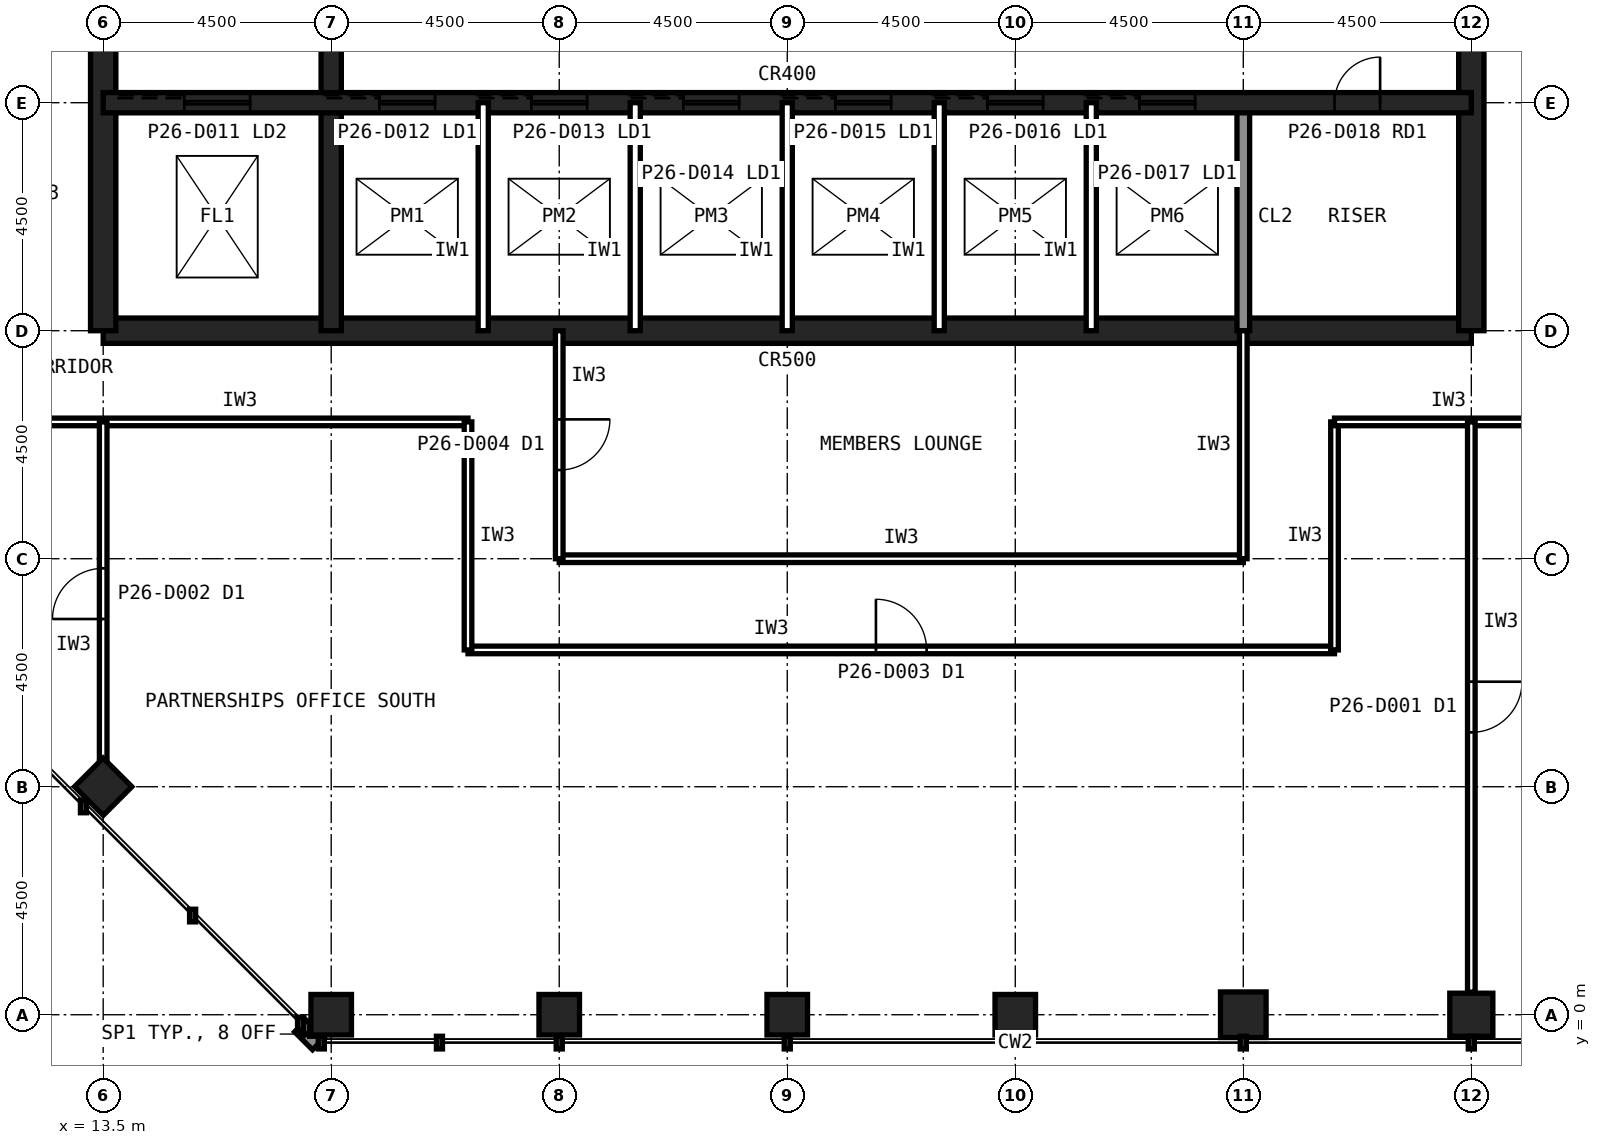
"""IFC4 building model, lengths in metres.
Left out: names, types, materials, properties, quantities, classifications, styles, units other than length and angle.
Written with IfcOpenShell. Run it as: python <this file> out.ifc"""

import sys

from ifc_helpers import new_model, si_unit, direction, frame, frame_2d, origin, origin_2d, place, context, subcontext, project, spatial, rectangle, hollow_rectangle, extrude, element, fill, save


model = new_model("IFC4")
c1 = context("Model", 3, precision=1e-05, world=origin(), true_north=direction((0.0, 1.0)))
c2 = subcontext(c1, "Body", "Model", "MODEL_VIEW")
j1 = project(units=[si_unit("LENGTHUNIT", "METRE"), si_unit("PLANEANGLEUNIT", "RADIAN")], contexts=[c1])
p1 = place(None, origin())
s1 = spatial("IfcSite", under=j1, at=p1, CompositionType="ELEMENT")
p2 = place(p1, origin())
s2 = spatial("IfcBuilding", under=s1, at=p2, CompositionType="ELEMENT")
p3 = place(p2, frame((0.0, 0.0, 115.6)))
s3 = spatial("IfcBuildingStorey", under=s2, at=p3, CompositionType="ELEMENT", Elevation=115.6)
for number, where, z_axis, x_axis in (
    (1, (18.0, 0.0, 0.0), (0.0, 0.0, 1.0), (1.0, 0.0, 0.0)),
    (2, (22.5, 0.0, 0.0), (0.0, 0.0, 1.0), (1.0, 0.0, 0.0)),
    (3, (27.0, 0.0, 0.0), (0.0, 0.0, 1.0), (1.0, 0.0, 0.0)),
    (4, (31.5, 0.0, 0.0), (0.0, 0.0, 1.0), (1.0, 0.0, 0.0)),
):
    element("IfcColumn", number, at=place(p3, frame(where, z_axis=z_axis, x_axis=x_axis)), inside=s3, PredefinedType="COLUMN", context=c2, shape_type="SweptSolid", body=[
        extrude(hollow_rectangle(XDim=0.8, YDim=0.8, WallThickness=0.045, at=origin_2d()), origin(), (0.0, 0.0, 1.0), 4.0),
    ])
p4 = place(p3, frame((36.0, 0.0, 0.0), z_axis=(0.0, 0.0, 1.0), x_axis=(1.0, 0.0, 0.0)))
e5 = element("IfcColumn", 5, at=p4, inside=s3, PredefinedType="COLUMN", context=c2, shape_type="SweptSolid", body=[
    extrude(hollow_rectangle(XDim=0.9, YDim=0.9, WallThickness=0.063, at=origin_2d()), origin(), (0.0, 0.0, 1.0), 4.0),
])
p5 = place(p3, frame((40.5, 0.0, 0.0), z_axis=(0.0, 0.0, 1.0), x_axis=(1.0, 0.0, 0.0)))
e6 = element("IfcColumn", 6, at=p5, inside=s3, PredefinedType="COLUMN", context=c2, shape_type="SweptSolid", body=[
    extrude(hollow_rectangle(XDim=0.85, YDim=0.85, WallThickness=0.05, at=origin_2d()), origin(), (0.0, 0.0, 1.0), 4.0),
])
p6 = place(p3, frame((13.5, 4.5, 0.0), z_axis=(0.0, 0.0, 1.0), x_axis=(0.707106781187, 0.707106781187, 0.0)))
e7 = element("IfcColumn", 7, at=p6, inside=s3, PredefinedType="COLUMN", context=c2, shape_type="SweptSolid", body=[
    extrude(hollow_rectangle(XDim=0.8, YDim=0.8, WallThickness=0.045, at=origin_2d()), origin(), (0.0, 0.0, 1.0), 4.0),
])
p7 = place(p3, frame((13.5, 13.5, 0.0), z_axis=(0.0, 0.0, 1.0), x_axis=(1.0, 0.0, 0.0)))
e8 = element("IfcWall", 8, at=p7, inside=s3, PredefinedType="SHEAR", context=c2, shape_type="SweptSolid", body=[
    extrude(rectangle(XDim=27.0, YDim=0.5, at=frame_2d((13.5, 0.0))), origin(), (0.0, 0.0, 1.0), 4.0),
])
p8 = place(p3, frame((40.5, 13.5, 0.0), z_axis=(0.0, 0.0, 1.0), x_axis=(0.0, 1.0, 0.0)))
e9 = element("IfcWall", 9, at=p8, inside=s3, PredefinedType="SHEAR", context=c2, shape_type="SweptSolid", body=[
    extrude(rectangle(XDim=27.0, YDim=0.5, at=frame_2d((13.5, 0.0))), origin(), (0.0, 0.0, 1.0), 4.0),
])
p9 = place(p8, frame((5.85, 0.0, 0.0)))
e10 = element("IfcOpeningElement", 10, at=p9, cuts=e9, PredefinedType="OPENING", context=c2, shape_type="SweptSolid", body=[
    extrude(rectangle(XDim=1.8, YDim=2.1, at=frame_2d((0.9, 1.05))), frame((0.0, 0.26, 0.0), z_axis=(0.0, -1.0, 0.0), x_axis=(1.0, 0.0, 0.0)), (0.0, 0.0, 1.0), 0.52),
])
p10 = place(p8, frame((19.65, 0.0, 0.0)))
e11 = element("IfcOpeningElement", 11, at=p10, cuts=e9, PredefinedType="OPENING", context=c2, shape_type="SweptSolid", body=[
    extrude(rectangle(XDim=1.2, YDim=2.1, at=frame_2d((0.6, 1.05))), frame((0.0, 0.26, 0.0), z_axis=(0.0, -1.0, 0.0), x_axis=(1.0, 0.0, 0.0)), (0.0, 0.0, 1.0), 0.52),
])
p11 = place(p3, frame((13.5, 40.5, 0.0), z_axis=(0.0, 0.0, 1.0), x_axis=(0.0, -1.0, 0.0)))
e12 = element("IfcWall", 12, at=p11, inside=s3, PredefinedType="SHEAR", context=c2, shape_type="SweptSolid", body=[
    extrude(rectangle(XDim=27.0, YDim=0.5, at=frame_2d((13.5, 0.0))), origin(), (0.0, 0.0, 1.0), 4.0),
])
p12 = place(p11, frame((19.65, 0.0, 0.0)))
e13 = element("IfcOpeningElement", 13, at=p12, cuts=e12, PredefinedType="OPENING", context=c2, shape_type="SweptSolid", body=[
    extrude(rectangle(XDim=1.2, YDim=2.1, at=frame_2d((0.6, 1.05))), frame((0.0, 0.26, 0.0), z_axis=(0.0, -1.0, 0.0), x_axis=(1.0, 0.0, 0.0)), (0.0, 0.0, 1.0), 0.52),
])
p13 = place(p11, frame((5.85, 0.0, 0.0)))
e14 = element("IfcOpeningElement", 14, at=p13, cuts=e12, PredefinedType="OPENING", context=c2, shape_type="SweptSolid", body=[
    extrude(rectangle(XDim=1.8, YDim=2.1, at=frame_2d((0.9, 1.05))), frame((0.0, 0.26, 0.0), z_axis=(0.0, -1.0, 0.0), x_axis=(1.0, 0.0, 0.0)), (0.0, 0.0, 1.0), 0.52),
])
p14 = place(p3, frame((18.0, 13.5, 0.0), z_axis=(0.0, 0.0, 1.0), x_axis=(0.0, 1.0, 0.0)))
e15 = element("IfcWall", 15, at=p14, inside=s3, PredefinedType="SHEAR", context=c2, shape_type="SweptSolid", body=[
    extrude(rectangle(XDim=18.0, YDim=0.4, at=frame_2d((9.0, 0.0))), origin(), (0.0, 0.0, 1.0), 4.0),
])
p15 = place(p3, frame((36.0, 13.5, 0.0), z_axis=(0.0, 0.0, 1.0), x_axis=(0.0, 1.0, 0.0)))
e16 = element("IfcWall", 16, at=p15, inside=s3, PredefinedType="SOLIDWALL", context=c2, shape_type="SweptSolid", body=[
    extrude(rectangle(XDim=4.5, YDim=0.25, at=frame_2d((2.25, 0.0))), origin(), (0.0, 0.0, 1.0), 3.84),
])
p16 = place(p3, frame((13.5, 18.0, 0.0), z_axis=(0.0, 0.0, 1.0), x_axis=(1.0, 0.0, 0.0)))
e17 = element("IfcWall", 17, at=p16, inside=s3, PredefinedType="SHEAR", context=c2, shape_type="SweptSolid", body=[
    extrude(rectangle(XDim=27.0, YDim=0.4, at=frame_2d((13.5, 0.0))), origin(), (0.0, 0.0, 1.0), 4.0),
])
p17 = place(p16, frame((24.3, 0.0, 0.0)))
e18 = element("IfcOpeningElement", 18, at=p17, cuts=e17, PredefinedType="OPENING", context=c2, shape_type="SweptSolid", body=[
    extrude(rectangle(XDim=0.9, YDim=2.1, at=frame_2d((0.45, 1.05))), frame((0.0, 0.21, 0.0), z_axis=(0.0, -1.0, 0.0), x_axis=(1.0, 0.0, 0.0)), (0.0, 0.0, 1.0), 0.42),
])
p18 = place(p16, frame((5.45, 0.0, 0.0)))
e19 = element("IfcOpeningElement", 19, at=p18, cuts=e17, PredefinedType="OPENING", context=c2, shape_type="SweptSolid", body=[
    extrude(rectangle(XDim=1.1, YDim=2.1, at=frame_2d((0.55, 1.05))), frame((0.0, 0.21, 0.0), z_axis=(0.0, -1.0, 0.0), x_axis=(1.0, 0.0, 0.0)), (0.0, 0.0, 1.0), 0.42),
])
p19 = place(p16, frame((8.45, 0.0, 0.0)))
e20 = element("IfcOpeningElement", 20, at=p19, cuts=e17, PredefinedType="OPENING", context=c2, shape_type="SweptSolid", body=[
    extrude(rectangle(XDim=1.1, YDim=2.1, at=frame_2d((0.55, 1.05))), frame((0.0, 0.21, 0.0), z_axis=(0.0, -1.0, 0.0), x_axis=(1.0, 0.0, 0.0)), (0.0, 0.0, 1.0), 0.42),
])
p20 = place(p16, frame((11.45, 0.0, 0.0)))
e21 = element("IfcOpeningElement", 21, at=p20, cuts=e17, PredefinedType="OPENING", context=c2, shape_type="SweptSolid", body=[
    extrude(rectangle(XDim=1.1, YDim=2.1, at=frame_2d((0.55, 1.05))), frame((0.0, 0.21, 0.0), z_axis=(0.0, -1.0, 0.0), x_axis=(1.0, 0.0, 0.0)), (0.0, 0.0, 1.0), 0.42),
])
p21 = place(p16, frame((14.45, 0.0, 0.0)))
e22 = element("IfcOpeningElement", 22, at=p21, cuts=e17, PredefinedType="OPENING", context=c2, shape_type="SweptSolid", body=[
    extrude(rectangle(XDim=1.1, YDim=2.1, at=frame_2d((0.55, 1.05))), frame((0.0, 0.21, 0.0), z_axis=(0.0, -1.0, 0.0), x_axis=(1.0, 0.0, 0.0)), (0.0, 0.0, 1.0), 0.42),
])
p22 = place(p16, frame((17.45, 0.0, 0.0)))
e23 = element("IfcOpeningElement", 23, at=p22, cuts=e17, PredefinedType="OPENING", context=c2, shape_type="SweptSolid", body=[
    extrude(rectangle(XDim=1.1, YDim=2.1, at=frame_2d((0.55, 1.05))), frame((0.0, 0.21, 0.0), z_axis=(0.0, -1.0, 0.0), x_axis=(1.0, 0.0, 0.0)), (0.0, 0.0, 1.0), 0.42),
])
p23 = place(p16, frame((20.45, 0.0, 0.0)))
e24 = element("IfcOpeningElement", 24, at=p23, cuts=e17, PredefinedType="OPENING", context=c2, shape_type="SweptSolid", body=[
    extrude(rectangle(XDim=1.1, YDim=2.1, at=frame_2d((0.55, 1.05))), frame((0.0, 0.21, 0.0), z_axis=(0.0, -1.0, 0.0), x_axis=(1.0, 0.0, 0.0)), (0.0, 0.0, 1.0), 0.42),
])
p24 = place(p16, frame((1.6, 0.0, 0.0)))
e25 = element("IfcOpeningElement", 25, at=p24, cuts=e17, PredefinedType="OPENING", context=c2, shape_type="SweptSolid", body=[
    extrude(rectangle(XDim=1.3, YDim=2.2, at=frame_2d((0.65, 1.1))), frame((0.0, 0.21, 0.0), z_axis=(0.0, -1.0, 0.0), x_axis=(1.0, 0.0, 0.0)), (0.0, 0.0, 1.0), 0.42),
])
for number, where, z_axis, x_axis in (
    (26, (21.0, 13.5, 0.0), (0.0, 0.0, 1.0), (0.0, 1.0, 0.0)),
    (27, (24.0, 13.5, 0.0), (0.0, 0.0, 1.0), (0.0, 1.0, 0.0)),
    (28, (27.0, 13.5, 0.0), (0.0, 0.0, 1.0), (0.0, 1.0, 0.0)),
    (29, (30.0, 13.5, 0.0), (0.0, 0.0, 1.0), (0.0, 1.0, 0.0)),
    (30, (33.0, 13.5, 0.0), (0.0, 0.0, 1.0), (0.0, 1.0, 0.0)),
):
    element("IfcWall", number, at=place(p3, frame(where, z_axis=z_axis, x_axis=x_axis)), inside=s3, PredefinedType="PARTITIONING", context=c2, shape_type="SweptSolid", body=[
        extrude(rectangle(XDim=4.5, YDim=0.2, at=frame_2d((2.25, 0.0))), origin(), (0.0, 0.0, 1.0), 3.84),
    ])
p25 = place(p3, frame((20.7, 7.2, 0.0), z_axis=(0.0, 0.0, 1.0), x_axis=(1.0, 0.0, 0.0)))
e31 = element("IfcWall", 31, at=p25, inside=s3, PredefinedType="PARTITIONING", context=c2, shape_type="SweptSolid", body=[
    extrude(rectangle(XDim=17.1, YDim=0.15, at=frame_2d((8.55, 0.0))), origin(), (0.0, 0.0, 1.0), 3.84),
])
p26 = place(p25, frame((8.05, 0.0, 0.0)))
e32 = element("IfcOpeningElement", 32, at=p26, cuts=e31, PredefinedType="OPENING", context=c2, shape_type="SweptSolid", body=[
    extrude(rectangle(XDim=1.0, YDim=2.1, at=frame_2d((0.5, 1.05))), frame((0.0, 0.085, 0.0), z_axis=(0.0, -1.0, 0.0), x_axis=(1.0, 0.0, 0.0)), (0.0, 0.0, 1.0), 0.17),
])
p27 = place(p3, frame((11.7, 11.7, 0.0), z_axis=(0.0, 0.0, 1.0), x_axis=(1.0, 0.0, 0.0)))
e33 = element("IfcWall", 33, at=p27, inside=s3, PredefinedType="PARTITIONING", context=c2, shape_type="SweptSolid", body=[
    extrude(rectangle(XDim=9.0, YDim=0.15, at=frame_2d((4.5, 0.0))), origin(), (0.0, 0.0, 1.0), 3.84),
])
for number, where, z_axis, x_axis in (
    (34, (20.7, 11.7, 0.0), (0.0, 0.0, 1.0), (0.0, -1.0, 0.0)),
    (35, (37.8, 7.2, 0.0), (0.0, 0.0, 1.0), (0.0, 1.0, 0.0)),
    (36, (37.8, 11.7, 0.0), (0.0, 0.0, 1.0), (1.0, 0.0, 0.0)),
):
    element("IfcWall", number, at=place(p3, frame(where, z_axis=z_axis, x_axis=x_axis)), inside=s3, PredefinedType="PARTITIONING", context=c2, shape_type="SweptSolid", body=[
        extrude(rectangle(XDim=4.5, YDim=0.15, at=frame_2d((2.25, 0.0))), origin(), (0.0, 0.0, 1.0), 3.84),
    ])
p28 = place(p3, frame((22.5, 9.0, 0.0), z_axis=(0.0, 0.0, 1.0), x_axis=(1.0, 0.0, 0.0)))
e37 = element("IfcWall", 37, at=p28, inside=s3, PredefinedType="PARTITIONING", context=c2, shape_type="SweptSolid", body=[
    extrude(rectangle(XDim=13.5, YDim=0.15, at=frame_2d((6.75, 0.0))), origin(), (0.0, 0.0, 1.0), 3.84),
])
p29 = place(p3, frame((36.0, 9.0, 0.0), z_axis=(0.0, 0.0, 1.0), x_axis=(0.0, 1.0, 0.0)))
e38 = element("IfcWall", 38, at=p29, inside=s3, PredefinedType="PARTITIONING", context=c2, shape_type="SweptSolid", body=[
    extrude(rectangle(XDim=4.5, YDim=0.15, at=frame_2d((2.25, 0.0))), origin(), (0.0, 0.0, 1.0), 2.989),
])
p30 = place(p3, frame((22.5, 13.5, 0.0), z_axis=(0.0, 0.0, 1.0), x_axis=(0.0, -1.0, 0.0)))
e39 = element("IfcWall", 39, at=p30, inside=s3, PredefinedType="PARTITIONING", context=c2, shape_type="SweptSolid", body=[
    extrude(rectangle(XDim=4.5, YDim=0.15, at=frame_2d((2.25, 0.0))), origin(), (0.0, 0.0, 1.0), 2.989),
])
p31 = place(p30, frame((1.75, 0.0, 0.0)))
e40 = element("IfcOpeningElement", 40, at=p31, cuts=e39, PredefinedType="OPENING", context=c2, shape_type="SweptSolid", body=[
    extrude(rectangle(XDim=1.0, YDim=2.1, at=frame_2d((0.5, 1.05))), frame((0.0, 0.085, 0.0), z_axis=(0.0, -1.0, 0.0), x_axis=(1.0, 0.0, 0.0)), (0.0, 0.0, 1.0), 0.17),
])
p32 = place(p3, frame((13.5, 4.92, 0.0), z_axis=(0.0, 0.0, 1.0), x_axis=(0.0, 1.0, 0.0)))
e41 = element("IfcWall", 41, at=p32, inside=s3, PredefinedType="PARTITIONING", context=c2, shape_type="SweptSolid", body=[
    extrude(rectangle(XDim=6.78, YDim=0.15, at=frame_2d((3.39, 0.0))), origin(), (0.0, 0.0, 1.0), 2.989),
])
p33 = place(p32, frame((2.89, 0.0, 0.0)))
e42 = element("IfcOpeningElement", 42, at=p33, cuts=e41, PredefinedType="OPENING", context=c2, shape_type="SweptSolid", body=[
    extrude(rectangle(XDim=1.0, YDim=2.1, at=frame_2d((0.5, 1.05))), frame((0.0, 0.085, 0.0), z_axis=(0.0, -1.0, 0.0), x_axis=(1.0, 0.0, 0.0)), (0.0, 0.0, 1.0), 0.17),
])
p34 = place(p3, frame((40.5, 11.7, 0.0), z_axis=(0.0, 0.0, 1.0), x_axis=(0.0, -1.0, 0.0)))
e43 = element("IfcWall", 43, at=p34, inside=s3, PredefinedType="PARTITIONING", context=c2, shape_type="SweptSolid", body=[
    extrude(rectangle(XDim=11.255, YDim=0.15, at=frame_2d((5.627, 0.0))), origin(), (0.0, 0.0, 1.0), 2.989),
])
p35 = place(p34, frame((5.127, 0.0, 0.0)))
e44 = element("IfcOpeningElement", 44, at=p35, cuts=e43, PredefinedType="OPENING", context=c2, shape_type="SweptSolid", body=[
    extrude(rectangle(XDim=1.0, YDim=2.1, at=frame_2d((0.5, 1.05))), frame((0.0, 0.085, 0.0), z_axis=(0.0, -1.0, 0.0), x_axis=(1.0, 0.0, 0.0)), (0.0, 0.0, 1.0), 0.17),
])
p36 = place(p17, origin())
e45 = element("IfcDoor", 45, at=p36, inside=s3, OperationType="SINGLE_SWING_RIGHT", PredefinedType="DOOR", context=c2, shape_type="SweptSolid", body=[
    extrude(rectangle(XDim=0.9, YDim=2.1, at=frame_2d((0.45, 1.05))), frame((0.0, 0.025, 0.0), z_axis=(0.0, -1.0, 0.0), x_axis=(1.0, 0.0, 0.0)), (0.0, 0.0, 1.0), 0.05),
])
fill(e18, e45)
p37 = place(p18, origin())
e46 = element("IfcDoor", 46, at=p37, inside=s3, OperationType="SLIDING_TO_LEFT", PredefinedType="DOOR", context=c2, shape_type="SweptSolid", body=[
    extrude(rectangle(XDim=1.1, YDim=2.1, at=frame_2d((0.55, 1.05))), frame((0.0, 0.025, 0.0), z_axis=(0.0, -1.0, 0.0), x_axis=(1.0, 0.0, 0.0)), (0.0, 0.0, 1.0), 0.05),
])
fill(e19, e46)
p38 = place(p19, origin())
e47 = element("IfcDoor", 47, at=p38, inside=s3, OperationType="SLIDING_TO_LEFT", PredefinedType="DOOR", context=c2, shape_type="SweptSolid", body=[
    extrude(rectangle(XDim=1.1, YDim=2.1, at=frame_2d((0.55, 1.05))), frame((0.0, 0.025, 0.0), z_axis=(0.0, -1.0, 0.0), x_axis=(1.0, 0.0, 0.0)), (0.0, 0.0, 1.0), 0.05),
])
fill(e20, e47)
p39 = place(p20, origin())
e48 = element("IfcDoor", 48, at=p39, inside=s3, OperationType="SLIDING_TO_LEFT", PredefinedType="DOOR", context=c2, shape_type="SweptSolid", body=[
    extrude(rectangle(XDim=1.1, YDim=2.1, at=frame_2d((0.55, 1.05))), frame((0.0, 0.025, 0.0), z_axis=(0.0, -1.0, 0.0), x_axis=(1.0, 0.0, 0.0)), (0.0, 0.0, 1.0), 0.05),
])
fill(e21, e48)
p40 = place(p21, origin())
e49 = element("IfcDoor", 49, at=p40, inside=s3, OperationType="SLIDING_TO_LEFT", PredefinedType="DOOR", context=c2, shape_type="SweptSolid", body=[
    extrude(rectangle(XDim=1.1, YDim=2.1, at=frame_2d((0.55, 1.05))), frame((0.0, 0.025, 0.0), z_axis=(0.0, -1.0, 0.0), x_axis=(1.0, 0.0, 0.0)), (0.0, 0.0, 1.0), 0.05),
])
fill(e22, e49)
p41 = place(p22, origin())
e50 = element("IfcDoor", 50, at=p41, inside=s3, OperationType="SLIDING_TO_LEFT", PredefinedType="DOOR", context=c2, shape_type="SweptSolid", body=[
    extrude(rectangle(XDim=1.1, YDim=2.1, at=frame_2d((0.55, 1.05))), frame((0.0, 0.025, 0.0), z_axis=(0.0, -1.0, 0.0), x_axis=(1.0, 0.0, 0.0)), (0.0, 0.0, 1.0), 0.05),
])
fill(e23, e50)
p42 = place(p23, origin())
e51 = element("IfcDoor", 51, at=p42, inside=s3, OperationType="SLIDING_TO_LEFT", PredefinedType="DOOR", context=c2, shape_type="SweptSolid", body=[
    extrude(rectangle(XDim=1.1, YDim=2.1, at=frame_2d((0.55, 1.05))), frame((0.0, 0.025, 0.0), z_axis=(0.0, -1.0, 0.0), x_axis=(1.0, 0.0, 0.0)), (0.0, 0.0, 1.0), 0.05),
])
fill(e24, e51)
p43 = place(p24, origin())
e52 = element("IfcDoor", 52, at=p43, inside=s3, OperationType="SLIDING_TO_LEFT", PredefinedType="DOOR", context=c2, shape_type="SweptSolid", body=[
    extrude(rectangle(XDim=1.3, YDim=2.2, at=frame_2d((0.65, 1.1))), frame((0.0, 0.025, 0.0), z_axis=(0.0, -1.0, 0.0), x_axis=(1.0, 0.0, 0.0)), (0.0, 0.0, 1.0), 0.05),
])
fill(e25, e52)
p44 = place(p26, origin())
e53 = element("IfcDoor", 53, at=p44, inside=s3, OperationType="SINGLE_SWING_LEFT", PredefinedType="DOOR", context=c2, shape_type="SweptSolid", body=[
    extrude(rectangle(XDim=1.0, YDim=2.1, at=frame_2d((0.5, 1.05))), frame((0.0, 0.025, 0.0), z_axis=(0.0, -1.0, 0.0), x_axis=(1.0, 0.0, 0.0)), (0.0, 0.0, 1.0), 0.05),
])
fill(e32, e53)
p45 = place(p31, origin())
e54 = element("IfcDoor", 54, at=p45, inside=s3, OperationType="SINGLE_SWING_LEFT", PredefinedType="DOOR", context=c2, shape_type="SweptSolid", body=[
    extrude(rectangle(XDim=1.0, YDim=2.1, at=frame_2d((0.5, 1.05))), frame((0.0, 0.025, 0.0), z_axis=(0.0, -1.0, 0.0), x_axis=(1.0, 0.0, 0.0)), (0.0, 0.0, 1.0), 0.05),
])
fill(e40, e54)
p46 = place(p33, origin())
e55 = element("IfcDoor", 55, at=p46, inside=s3, OperationType="SINGLE_SWING_LEFT", PredefinedType="DOOR", context=c2, shape_type="SweptSolid", body=[
    extrude(rectangle(XDim=1.0, YDim=2.1, at=frame_2d((0.5, 1.05))), frame((0.0, 0.025, 0.0), z_axis=(0.0, -1.0, 0.0), x_axis=(1.0, 0.0, 0.0)), (0.0, 0.0, 1.0), 0.05),
])
fill(e42, e55)
p47 = place(p35, origin())
e56 = element("IfcDoor", 56, at=p47, inside=s3, OperationType="SINGLE_SWING_LEFT", PredefinedType="DOOR", context=c2, shape_type="SweptSolid", body=[
    extrude(rectangle(XDim=1.0, YDim=2.1, at=frame_2d((0.5, 1.05))), frame((0.0, 0.025, 0.0), z_axis=(0.0, -1.0, 0.0), x_axis=(1.0, 0.0, 0.0)), (0.0, 0.0, 1.0), 0.05),
])
fill(e44, e56)
save(model, sys.argv[1])
